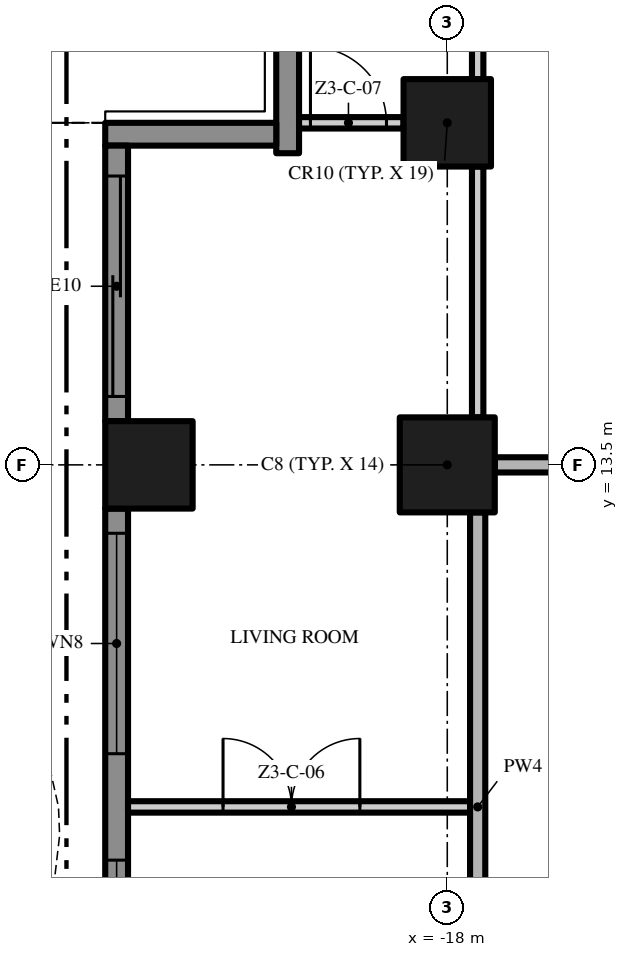
"""IFC4 building model, lengths in metres.
Left out: names, types, materials, properties, quantities, classifications, styles, units other than length and angle.
Written with IfcOpenShell. Run it as: python <this file> out.ifc"""

import sys

from ifc_helpers import new_model, si_unit, direction, frame, frame_2d, origin, origin_2d, place, context, subcontext, project, spatial, polyline, rectangle, outline, extrude, element, fill, save


model = new_model("IFC4")
c1 = context("Model", 3, precision=1e-05, world=origin(), true_north=direction((0.0, 1.0)))
c2 = subcontext(c1, "Body", "Model", "MODEL_VIEW")
j1 = project(units=[si_unit("LENGTHUNIT", "METRE"), si_unit("PLANEANGLEUNIT", "RADIAN")], contexts=[c1])
p1 = place(None, origin())
s1 = spatial("IfcSite", under=j1, at=p1, CompositionType="ELEMENT")
p2 = place(p1, origin())
s2 = spatial("IfcBuilding", under=s1, at=p2, CompositionType="ELEMENT")
p3 = place(p2, frame((0.0, 0.0, 147.8)))
s3 = spatial("IfcBuildingStorey", under=s2, at=p3, CompositionType="ELEMENT", Elevation=147.8)
p4 = place(p3, frame((-18.0, 13.5, 0.0), z_axis=(0.0, 0.0, 1.0), x_axis=(1.0, 0.0, 0.0)))
e1 = element("IfcColumn", 1, at=p4, inside=s3, PredefinedType="COLUMN", context=c2, shape_type="SweptSolid", body=[
    extrude(rectangle(XDim=1.25, YDim=1.25, at=origin_2d()), origin(), (0.0, 0.0, 1.0), 3.5),
])
for number, where, z_axis, x_axis in (
    (2, (-21.925, 13.5, 0.0), (0.0, 0.0, 1.0), (1.0, 0.0, 0.0)),
    (3, (-18.0, 18.0, 0.0), (0.0, 0.0, 1.0), (1.0, 0.0, 0.0)),
):
    element("IfcColumn", number, at=place(p3, frame(where, z_axis=z_axis, x_axis=x_axis)), inside=s3, PredefinedType="COLUMN", context=c2, shape_type="SweptSolid", body=[
        extrude(rectangle(XDim=1.15, YDim=1.15, at=origin_2d()), origin(), (0.0, 0.0, 1.0), 3.5),
    ])
p5 = place(p3, frame((-20.1, 17.6, 0.0), z_axis=(0.0, 0.0, 1.0), x_axis=(0.0, 1.0, 0.0)))
e4 = element("IfcWall", 4, at=p5, inside=s3, PredefinedType="SOLIDWALL", context=c2, shape_type="SweptSolid", body=[
    extrude(rectangle(XDim=2.35, YDim=0.3, at=frame_2d((1.175, 0.0))), origin(), (0.0, 0.0, 1.0), 3.5),
])
p6 = place(p3, frame((-22.5, 17.85, 0.0), z_axis=(0.0, 0.0, 1.0), x_axis=(1.0, 0.0, 0.0)))
e5 = element("IfcWall", 5, at=p6, inside=s3, PredefinedType="SOLIDWALL", context=c2, shape_type="SweptSolid", body=[
    extrude(rectangle(XDim=2.25, YDim=0.3, at=frame_2d((1.125, 0.0))), origin(), (0.0, 0.0, 1.0), 3.5),
])
p7 = place(p3, frame((-22.35, 14.075, 0.0), z_axis=(0.0, 0.0, 1.0), x_axis=(0.0, 1.0, 0.0)))
e6 = element("IfcWall", 6, at=p7, inside=s3, PredefinedType="SOLIDWALL", context=c2, shape_type="SweptSolid", body=[
    extrude(rectangle(XDim=3.625, YDim=0.3, at=frame_2d((1.812, 0.0))), origin(), (0.0, 0.0, 1.0), 3.5),
])
p8 = place(p7, frame((0.325, 0.0, 0.0)))
e7 = element("IfcOpeningElement", 7, at=p8, cuts=e6, PredefinedType="OPENING", context=c2, shape_type="SweptSolid", body=[
    extrude(rectangle(XDim=2.9, YDim=2.4, at=frame_2d((1.45, 1.2))), frame((0.0, 0.16, 0.0), z_axis=(0.0, -1.0, 0.0), x_axis=(1.0, 0.0, 0.0)), (0.0, 0.0, 1.0), 0.32),
])
p9 = place(p3, frame((-22.35, 5.075, 0.0), z_axis=(0.0, 0.0, 1.0), x_axis=(0.0, 1.0, 0.0)))
e8 = element("IfcWall", 8, at=p9, inside=s3, PredefinedType="SOLIDWALL", context=c2, shape_type="SweptSolid", body=[
    extrude(rectangle(XDim=7.85, YDim=0.3, at=frame_2d((3.925, 0.0))), origin(), (0.0, 0.0, 1.0), 3.5),
])
p10 = place(p9, frame((4.625, 0.0, 0.45)))
e9 = element("IfcOpeningElement", 9, at=p10, cuts=e8, PredefinedType="OPENING", context=c2, shape_type="SweptSolid", body=[
    extrude(rectangle(XDim=2.9, YDim=2.65, at=frame_2d((1.45, 1.325))), frame((0.0, 0.16, 0.0), z_axis=(0.0, -1.0, 0.0), x_axis=(1.0, 0.0, 0.0)), (0.0, 0.0, 1.0), 0.32),
])
p11 = place(p9, frame((0.325, 0.0, 0.45)))
e10 = element("IfcOpeningElement", 10, at=p11, cuts=e8, PredefinedType="OPENING", context=c2, shape_type="SweptSolid", body=[
    extrude(rectangle(XDim=2.9, YDim=2.65, at=frame_2d((1.45, 1.325))), frame((0.0, 0.16, 0.0), z_axis=(0.0, -1.0, 0.0), x_axis=(1.0, 0.0, 0.0)), (0.0, 0.0, 1.0), 0.32),
])
p12 = place(p3, origin())
e11 = element("IfcWall", 11, at=p12, inside=s3, PredefinedType="USERDEFINED", context=c2, shape_type="SweptSolid", body=[
    extrude(outline(polyline([(-25.149, 18.0), (-25.485, 16.5), (-25.5, 16.125), (-25.369, 15.0), (-24.845, 13.5), (-24.112, 12.0), (-23.451, 10.5), (-23.115, 9.0), (-23.1, 8.625), (-23.231, 7.5), (-23.755, 6.0), (-24.488, 4.5), (-25.149, 3.0), (-25.485, 1.5), (-25.5, 1.125), (-25.369, 0.0), (-24.845, -1.5), (-24.112, -3.0), (-23.451, -4.5), (-23.115, -6.0), (-23.1, -6.375), (-23.231, -7.5), (-23.755, -9.0), (-24.488, -10.5), (-25.149, -12.0), (-25.485, -13.5), (-25.241, -13.555), (-24.91, -12.079), (-24.261, -10.605), (-23.524, -9.096), (-22.986, -7.556), (-22.849, -6.385), (-22.866, -5.967), (-23.213, -4.421), (-23.885, -2.895), (-24.614, -1.404), (-25.124, 0.056), (-25.249, 1.135), (-25.236, 1.467), (-24.91, 2.921), (-24.261, 4.395), (-23.524, 5.904), (-22.986, 7.444), (-22.849, 8.615), (-22.866, 9.033), (-23.213, 10.579), (-23.885, 12.105), (-24.614, 13.596), (-25.124, 15.056), (-25.249, 16.135), (-25.236, 16.467), (-24.905, 17.945), (-25.149, 18.0)])), origin(), (0.0, 0.0, 1.0), 0.9),
])
p13 = place(p3, frame((-22.2, 9.0, 0.0), z_axis=(0.0, 0.0, 1.0), x_axis=(1.0, 0.0, 0.0)))
e12 = element("IfcWall", 12, at=p13, inside=s3, PredefinedType="PARTITIONING", context=c2, shape_type="SweptSolid", body=[
    extrude(rectangle(XDim=4.5, YDim=0.15, at=frame_2d((2.25, 0.0))), origin(), (0.0, 0.0, 1.0), 3.5),
])
p14 = place(p13, frame((1.25, 0.0, 0.0)))
e13 = element("IfcOpeningElement", 13, at=p14, cuts=e12, PredefinedType="OPENING", context=c2, shape_type="SweptSolid", body=[
    extrude(rectangle(XDim=1.8, YDim=2.4, at=frame_2d((0.9, 1.2))), frame((0.0, 0.085, 0.0), z_axis=(0.0, -1.0, 0.0), x_axis=(1.0, 0.0, 0.0)), (0.0, 0.0, 1.0), 0.17),
])
p15 = place(p3, frame((-17.375, 13.5, 0.0), z_axis=(0.0, 0.0, 1.0), x_axis=(1.0, 0.0, 0.0)))
e14 = element("IfcWall", 14, at=p15, inside=s3, PredefinedType="PARTITIONING", context=c2, shape_type="SweptSolid", body=[
    extrude(rectangle(XDim=3.875, YDim=0.2, at=frame_2d((1.938, 0.0))), origin(), (0.0, 0.0, 1.0), 3.5),
])
p16 = place(p15, frame((1.35, 0.0, 0.0)))
e15 = element("IfcOpeningElement", 15, at=p16, cuts=e14, PredefinedType="OPENING", context=c2, shape_type="SweptSolid", body=[
    extrude(rectangle(XDim=0.9, YDim=2.1, at=frame_2d((0.45, 1.05))), frame((0.0, 0.11, 0.0), z_axis=(0.0, -1.0, 0.0), x_axis=(1.0, 0.0, 0.0)), (0.0, 0.0, 1.0), 0.22),
])
p17 = place(p3, frame((-19.95, 18.0, 0.0), z_axis=(0.0, 0.0, 1.0), x_axis=(1.0, 0.0, 0.0)))
e16 = element("IfcWall", 16, at=p17, inside=s3, PredefinedType="PARTITIONING", context=c2, shape_type="SweptSolid", body=[
    extrude(rectangle(XDim=1.375, YDim=0.15, at=frame_2d((0.688, 0.0))), origin(), (0.0, 0.0, 1.0), 3.5),
])
p18 = place(p17, frame((0.15, 0.0, 0.0)))
e17 = element("IfcOpeningElement", 17, at=p18, cuts=e16, PredefinedType="OPENING", context=c2, shape_type="SweptSolid", body=[
    extrude(rectangle(XDim=1.0, YDim=2.4, at=frame_2d((0.5, 1.2))), frame((0.0, 0.085, 0.0), z_axis=(0.0, -1.0, 0.0), x_axis=(1.0, 0.0, 0.0)), (0.0, 0.0, 1.0), 0.17),
])
p19 = place(p3, frame((-17.6, 5.125, 0.0), z_axis=(0.0, 0.0, 1.0), x_axis=(0.0, 1.0, 0.0)))
e18 = element("IfcWall", 18, at=p19, inside=s3, PredefinedType="PARTITIONING", context=c2, shape_type="SweptSolid", body=[
    extrude(rectangle(XDim=7.75, YDim=0.2, at=frame_2d((3.875, 0.0))), origin(), (0.0, 0.0, 1.0), 3.5),
])
p20 = place(p19, frame((1.0, 0.0, 0.0)))
e19 = element("IfcOpeningElement", 19, at=p20, cuts=e18, PredefinedType="OPENING", context=c2, shape_type="SweptSolid", body=[
    extrude(rectangle(XDim=1.2, YDim=2.4, at=frame_2d((0.6, 1.2))), frame((0.0, 0.11, 0.0), z_axis=(0.0, -1.0, 0.0), x_axis=(1.0, 0.0, 0.0)), (0.0, 0.0, 1.0), 0.22),
])
p21 = place(p3, frame((-17.6, 14.125, 0.0), z_axis=(0.0, 0.0, 1.0), x_axis=(0.0, 1.0, 0.0)))
e20 = element("IfcWall", 20, at=p21, inside=s3, PredefinedType="PARTITIONING", context=c2, shape_type="SweptSolid", body=[
    extrude(rectangle(XDim=3.3, YDim=0.15, at=frame_2d((1.65, 0.0))), origin(), (0.0, 0.0, 1.0), 3.5),
])
p22 = place(p3, frame((-17.6, 18.575, 0.0), z_axis=(0.0, 0.0, 1.0), x_axis=(0.0, 1.0, 0.0)))
e21 = element("IfcWall", 21, at=p22, inside=s3, PredefinedType="PARTITIONING", context=c2, shape_type="SweptSolid", body=[
    extrude(rectangle(XDim=2.775, YDim=0.15, at=frame_2d((1.387, 0.0))), origin(), (0.0, 0.0, 1.0), 3.5),
])
p23 = place(p8, origin())
e22 = element("IfcDoor", 22, at=p23, inside=s3, OperationType="SINGLE_SWING_LEFT", PredefinedType="DOOR", context=c2, shape_type="SweptSolid", body=[
    extrude(rectangle(XDim=2.9, YDim=2.4, at=frame_2d((1.45, 1.2))), frame((0.0, 0.025, 0.0), z_axis=(0.0, -1.0, 0.0), x_axis=(1.0, 0.0, 0.0)), (0.0, 0.0, 1.0), 0.05),
])
fill(e7, e22)
p24 = place(p10, origin())
e23 = element("IfcWindow", 23, at=p24, inside=s3, PartitioningType="SINGLE_PANEL", PredefinedType="WINDOW", context=c2, shape_type="SweptSolid", body=[
    extrude(rectangle(XDim=2.9, YDim=2.65, at=frame_2d((1.45, 1.325))), frame((0.0, 0.03, 0.0), z_axis=(0.0, -1.0, 0.0), x_axis=(1.0, 0.0, 0.0)), (0.0, 0.0, 1.0), 0.06),
])
fill(e9, e23)
p25 = place(p11, origin())
e24 = element("IfcWindow", 24, at=p25, inside=s3, PartitioningType="SINGLE_PANEL", PredefinedType="WINDOW", context=c2, shape_type="SweptSolid", body=[
    extrude(rectangle(XDim=2.9, YDim=2.65, at=frame_2d((1.45, 1.325))), frame((0.0, 0.03, 0.0), z_axis=(0.0, -1.0, 0.0), x_axis=(1.0, 0.0, 0.0)), (0.0, 0.0, 1.0), 0.06),
])
fill(e10, e24)
p26 = place(p14, origin())
e25 = element("IfcDoor", 25, at=p26, inside=s3, OperationType="DOUBLE_DOOR_SINGLE_SWING", PredefinedType="DOOR", context=c2, shape_type="SweptSolid", body=[
    extrude(rectangle(XDim=1.8, YDim=2.4, at=frame_2d((0.9, 1.2))), frame((0.0, 0.025, 0.0), z_axis=(0.0, -1.0, 0.0), x_axis=(1.0, 0.0, 0.0)), (0.0, 0.0, 1.0), 0.05),
])
fill(e13, e25)
p27 = place(p18, origin())
e26 = element("IfcDoor", 26, at=p27, inside=s3, OperationType="SINGLE_SWING_LEFT", PredefinedType="DOOR", context=c2, shape_type="SweptSolid", body=[
    extrude(rectangle(XDim=1.0, YDim=2.4, at=frame_2d((0.5, 1.2))), frame((0.0, 0.025, 0.0), z_axis=(0.0, -1.0, 0.0), x_axis=(1.0, 0.0, 0.0)), (0.0, 0.0, 1.0), 0.05),
])
fill(e17, e26)
save(model, sys.argv[1])
